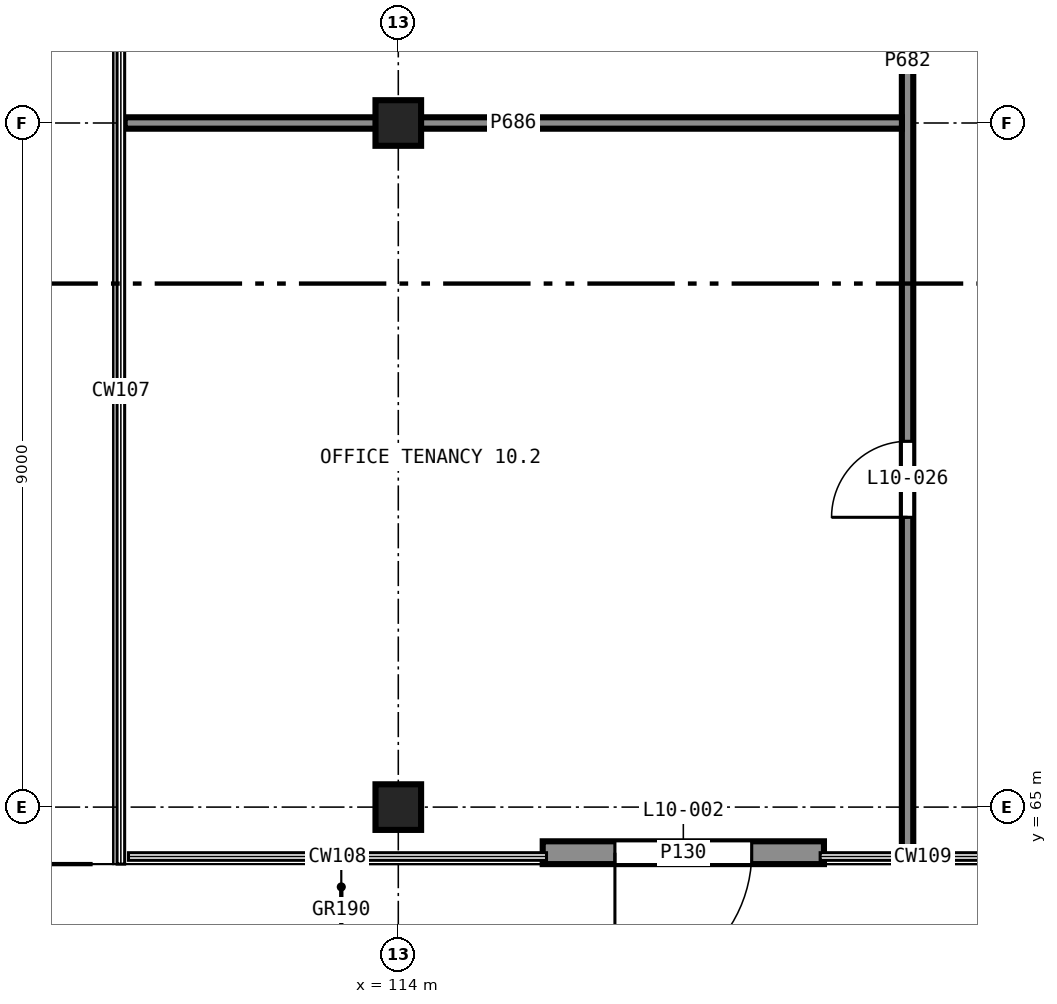
"""IFC4 building model, lengths in metres.
Left out: names, types, materials, properties, quantities, classifications, styles, units other than length and angle.
Written with IfcOpenShell. Run it as: python <this file> out.ifc"""

import sys

from ifc_helpers import new_model, si_unit, direction, frame, frame_2d, origin, origin_2d, place, context, subcontext, project, spatial, rectangle, extrude, element, fill, save


model = new_model("IFC4")
c1 = context("Model", 3, precision=1e-05, world=origin(), true_north=direction((0.0, 1.0)))
c2 = subcontext(c1, "Body", "Model", "MODEL_VIEW")
j1 = project(units=[si_unit("LENGTHUNIT", "METRE"), si_unit("PLANEANGLEUNIT", "RADIAN")], contexts=[c1])
p1 = place(None, origin())
s1 = spatial("IfcSite", under=j1, at=p1, CompositionType="ELEMENT")
p2 = place(p1, origin())
s2 = spatial("IfcBuilding", under=s1, at=p2, CompositionType="ELEMENT")
p3 = place(p2, frame((0.0, 0.0, 41.5)))
s3 = spatial("IfcBuildingStorey", under=s2, at=p3, CompositionType="ELEMENT", Elevation=41.5)
for number, where, z_axis, x_axis in (
    (1, (114.0, 65.0, 0.0), (0.0, 0.0, 1.0), (1.0, 0.0, 0.0)),
    (2, (114.0, 74.0, 0.0), (0.0, 0.0, 1.0), (1.0, 0.0, 0.0)),
):
    element("IfcColumn", number, at=place(p3, frame(where, z_axis=z_axis, x_axis=x_axis)), inside=s3, PredefinedType="COLUMN", context=c2, shape_type="SweptSolid", body=[
        extrude(rectangle(XDim=0.6, YDim=0.6, at=origin_2d()), origin(), (0.0, 0.0, 1.0), 4.0),
    ])
p4 = place(p3, frame((115.9, 64.4, 0.0), z_axis=(0.0, 0.0, 1.0), x_axis=(1.0, 0.0, 0.0)))
e3 = element("IfcWall", 3, at=p4, inside=s3, PredefinedType="SOLIDWALL", context=c2, shape_type="SweptSolid", body=[
    extrude(rectangle(XDim=3.7, YDim=0.3, at=frame_2d((1.85, 0.0))), origin(), (0.0, 0.0, 1.0), 3.75),
])
p5 = place(p4, frame((0.95, 0.0, 0.0)))
e4 = element("IfcOpeningElement", 4, at=p5, cuts=e3, PredefinedType="OPENING", context=c2, shape_type="SweptSolid", body=[
    extrude(rectangle(XDim=1.8, YDim=2.4, at=frame_2d((0.9, 1.2))), frame((0.0, 0.16, 0.0), z_axis=(0.0, -1.0, 0.0), x_axis=(1.0, 0.0, 0.0)), (0.0, 0.0, 1.0), 0.32),
])
p6 = place(p3, frame((120.7, 64.4, 0.0), z_axis=(0.0, 0.0, 1.0), x_axis=(0.0, 1.0, 0.0)))
e5 = element("IfcWall", 5, at=p6, inside=s3, PredefinedType="PARTITIONING", context=c2, shape_type="SweptSolid", body=[
    extrude(rectangle(XDim=20.825, YDim=0.15, at=frame_2d((10.413, 0.0))), origin(), (0.0, 0.0, 1.0), 3.75),
])
p7 = place(p6, frame((4.413, 0.0, 0.0)))
e6 = element("IfcOpeningElement", 6, at=p7, cuts=e5, PredefinedType="OPENING", context=c2, shape_type="SweptSolid", body=[
    extrude(rectangle(XDim=1.0, YDim=2.1, at=frame_2d((0.5, 1.05))), frame((0.0, 0.085, 0.0), z_axis=(0.0, -1.0, 0.0), x_axis=(1.0, 0.0, 0.0)), (0.0, 0.0, 1.0), 0.17),
])
p8 = place(p6, frame((13.6, 0.0, 0.0)))
e7 = element("IfcOpeningElement", 7, at=p8, cuts=e5, PredefinedType="OPENING", context=c2, shape_type="SweptSolid", body=[
    extrude(rectangle(XDim=1.0, YDim=2.1, at=frame_2d((0.5, 1.05))), frame((0.0, 0.085, 0.0), z_axis=(0.0, -1.0, 0.0), x_axis=(1.0, 0.0, 0.0)), (0.0, 0.0, 1.0), 0.17),
])
p9 = place(p3, frame((110.4, 74.0, 0.0), z_axis=(0.0, 0.0, 1.0), x_axis=(1.0, 0.0, 0.0)))
e8 = element("IfcWall", 8, at=p9, inside=s3, PredefinedType="PARTITIONING", context=c2, shape_type="SweptSolid", body=[
    extrude(rectangle(XDim=10.226, YDim=0.15, at=frame_2d((5.113, 0.0))), origin(), (0.0, 0.0, 1.0), 2.85),
])
p10 = place(p5, frame((1.8, 0.0, 0.0), z_axis=(0.0, 0.0, 1.0), x_axis=(-1.0, 0.0, 0.0)))
e9 = element("IfcDoor", 9, at=p10, inside=s3, OperationType="DOUBLE_DOOR_SINGLE_SWING", PredefinedType="DOOR", context=c2, shape_type="SweptSolid", body=[
    extrude(rectangle(XDim=1.8, YDim=2.4, at=frame_2d((0.9, 1.2))), frame((0.0, 0.025, 0.0), z_axis=(0.0, -1.0, 0.0), x_axis=(1.0, 0.0, 0.0)), (0.0, 0.0, 1.0), 0.05),
])
fill(e4, e9)
p11 = place(p7, origin())
e10 = element("IfcDoor", 10, at=p11, inside=s3, OperationType="SINGLE_SWING_RIGHT", PredefinedType="DOOR", context=c2, shape_type="SweptSolid", body=[
    extrude(rectangle(XDim=1.0, YDim=2.1, at=frame_2d((0.5, 1.05))), frame((0.0, 0.025, 0.0), z_axis=(0.0, -1.0, 0.0), x_axis=(1.0, 0.0, 0.0)), (0.0, 0.0, 1.0), 0.05),
])
fill(e6, e10)
save(model, sys.argv[1])
